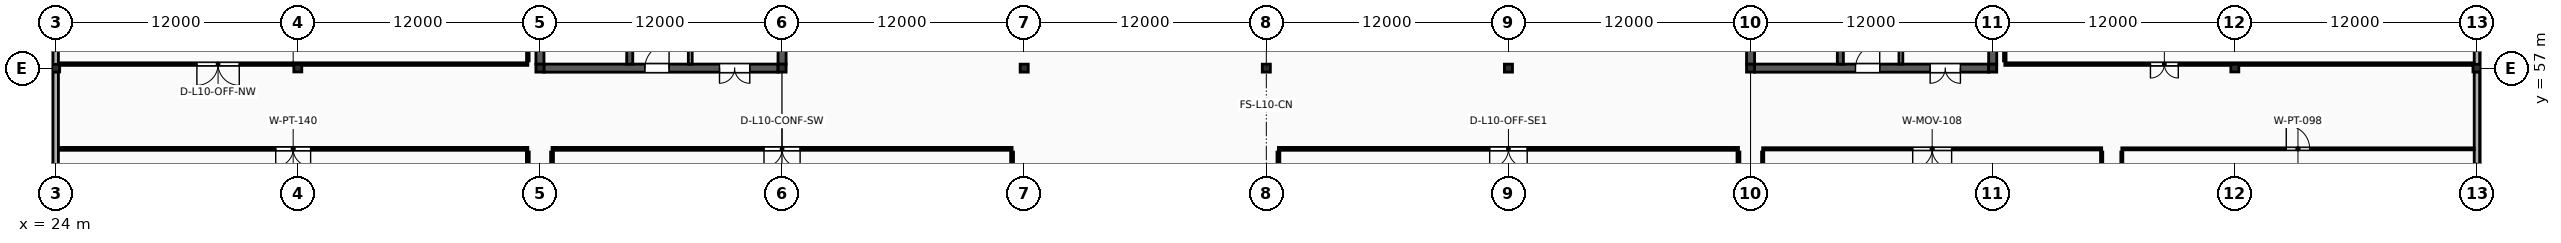
"""IFC4 building model, lengths in metres.
Left out: names, types, materials, properties, quantities, classifications, styles, units other than length and angle.
Written with IfcOpenShell. Run it as: python <this file> out.ifc"""

import sys

from ifc_helpers import new_model, si_unit, direction, frame, frame_2d, origin, origin_2d, place, context, subcontext, project, spatial, rectangle, i_section, extrude, element, fill, save


model = new_model("IFC4")
c1 = context("Model", 3, precision=1e-05, world=origin(), true_north=direction((0.0, 1.0)))
c2 = subcontext(c1, "Body", "Model", "MODEL_VIEW")
j1 = project(units=[si_unit("LENGTHUNIT", "METRE"), si_unit("PLANEANGLEUNIT", "RADIAN")], contexts=[c1])
p1 = place(None, origin())
s1 = spatial("IfcSite", under=j1, at=p1, CompositionType="ELEMENT")
p2 = place(p1, origin())
s2 = spatial("IfcBuilding", under=s1, at=p2, CompositionType="ELEMENT")
p3 = place(p2, frame((0.0, 0.0, 41.6)))
s3 = spatial("IfcBuildingStorey", under=s2, at=p3, CompositionType="ELEMENT", Elevation=41.6)
for number, where, z_axis, x_axis in (
    (1, (24.0, 57.0, 0.0), (0.0, 0.0, 1.0), (1.0, 0.0, 0.0)),
    (2, (36.0, 57.0, 0.0), (0.0, 0.0, 1.0), (1.0, 0.0, 0.0)),
):
    element("IfcColumn", number, at=place(p3, frame(where, z_axis=z_axis, x_axis=x_axis)), inside=s3, PredefinedType="COLUMN", context=c2, shape_type="SweptSolid", body=[
        extrude(i_section(OverallWidth=0.394, OverallDepth=0.375, WebThickness=0.017, FlangeThickness=0.028, FilletRadius=0.018, at=origin_2d()), origin(), (0.0, 0.0, 1.0), 4.0),
    ])
for number, where, z_axis, x_axis in (
    (3, (48.0, 57.0, 0.0), (0.0, 0.0, 1.0), (1.0, 0.0, 0.0)),
    (4, (60.0, 57.0, 0.0), (0.0, 0.0, 1.0), (1.0, 0.0, 0.0)),
    (5, (72.0, 57.0, 0.0), (0.0, 0.0, 1.0), (1.0, 0.0, 0.0)),
    (6, (84.0, 57.0, 0.0), (0.0, 0.0, 1.0), (1.0, 0.0, 0.0)),
    (7, (96.0, 57.0, 0.0), (0.0, 0.0, 1.0), (1.0, 0.0, 0.0)),
    (8, (108.0, 57.0, 0.0), (0.0, 0.0, 1.0), (1.0, 0.0, 0.0)),
    (9, (120.0, 57.0, 0.0), (0.0, 0.0, 1.0), (1.0, 0.0, 0.0)),
):
    element("IfcColumn", number, at=place(p3, frame(where, z_axis=z_axis, x_axis=x_axis)), inside=s3, PredefinedType="COLUMN", context=c2, shape_type="SweptSolid", body=[
        extrude(i_section(OverallWidth=0.399, OverallDepth=0.393, WebThickness=0.023, FlangeThickness=0.037, FilletRadius=0.018, at=origin_2d()), origin(), (0.0, 0.0, 1.0), 4.0),
    ])
for number, where, z_axis, x_axis in (
    (10, (132.0, 57.0, 0.0), (0.0, 0.0, 1.0), (1.0, 0.0, 0.0)),
    (11, (144.0, 57.0, 0.0), (0.0, 0.0, 1.0), (1.0, 0.0, 0.0)),
):
    element("IfcColumn", number, at=place(p3, frame(where, z_axis=z_axis, x_axis=x_axis)), inside=s3, PredefinedType="COLUMN", context=c2, shape_type="SweptSolid", body=[
        extrude(i_section(OverallWidth=0.394, OverallDepth=0.375, WebThickness=0.017, FlangeThickness=0.028, FilletRadius=0.018, at=origin_2d()), origin(), (0.0, 0.0, 1.0), 4.0),
    ])
p4 = place(p3, frame((48.197, 57.0, 0.0), z_axis=(0.0, 0.0, 1.0), x_axis=(1.0, 0.0, 0.0)))
e12 = element("IfcWall", 12, at=p4, inside=s3, PredefinedType="SHEAR", context=c2, shape_type="SweptSolid", body=[
    extrude(rectangle(XDim=11.607, YDim=0.4, at=frame_2d((5.803, 0.0))), origin(), (0.0, 0.0, 1.0), 3.828),
])
p5 = place(p4, frame((5.004, 0.0, 0.0)))
e13 = element("IfcOpeningElement", 13, at=p5, cuts=e12, PredefinedType="OPENING", context=c2, shape_type="SweptSolid", body=[
    extrude(rectangle(XDim=1.2, YDim=2.2, at=frame_2d((0.6, 1.1))), frame((0.0, 0.215, 0.0), z_axis=(0.0, -1.0, 0.0), x_axis=(1.0, 0.0, 0.0)), (0.0, 0.0, 1.0), 0.43),
])
p6 = place(p4, frame((8.703, 0.0, 0.0)))
e14 = element("IfcOpeningElement", 14, at=p6, cuts=e12, PredefinedType="OPENING", context=c2, shape_type="SweptSolid", body=[
    extrude(rectangle(XDim=1.5, YDim=2.25, at=frame_2d((0.75, 1.125))), frame((0.0, 0.215, 0.0), z_axis=(0.0, -1.0, 0.0), x_axis=(1.0, 0.0, 0.0)), (0.0, 0.0, 1.0), 0.43),
])
for number, where, z_axis, x_axis in (
    (15, (48.0, 57.194, 0.0), (0.0, 0.0, 1.0), (0.0, 1.0, 0.0)),
    (16, (60.0, 57.194, 0.0), (0.0, 0.0, 1.0), (0.0, 1.0, 0.0)),
):
    element("IfcWall", number, at=place(p3, frame(where, z_axis=z_axis, x_axis=x_axis)), inside=s3, PredefinedType="SHEAR", context=c2, shape_type="SweptSolid", body=[
        extrude(rectangle(XDim=11.613, YDim=0.4, at=frame_2d((5.806, 0.0))), origin(), (0.0, 0.0, 1.0), 3.828),
    ])
p7 = place(p3, frame((52.45, 57.197, 0.0), z_axis=(0.0, 0.0, 1.0), x_axis=(0.0, 1.0, 0.0)))
e17 = element("IfcWall", 17, at=p7, inside=s3, PredefinedType="SHEAR", context=c2, shape_type="SweptSolid", body=[
    extrude(rectangle(XDim=11.606, YDim=0.3, at=frame_2d((5.803, 0.0))), origin(), (0.0, 0.0, 1.0), 3.828),
])
p8 = place(p7, frame((0.9, 0.0, 0.0)))
e18 = element("IfcOpeningElement", 18, at=p8, cuts=e17, PredefinedType="OPENING", context=c2, shape_type="SweptSolid", body=[
    extrude(rectangle(XDim=1.1, YDim=2.2, at=frame_2d((0.55, 1.1))), frame((0.0, 0.165, 0.0), z_axis=(0.0, -1.0, 0.0), x_axis=(1.0, 0.0, 0.0)), (0.0, 0.0, 1.0), 0.33),
])
p9 = place(p3, frame((55.45, 57.2, 0.0), z_axis=(0.0, 0.0, 1.0), x_axis=(0.0, 1.0, 0.0)))
e19 = element("IfcWall", 19, at=p9, inside=s3, PredefinedType="SOLIDWALL", context=c2, shape_type="SweptSolid", body=[
    extrude(rectangle(XDim=8.48, YDim=0.19, at=frame_2d((4.24, 0.0))), origin(), (0.0, 0.0, 1.0), 3.818),
])
p10 = place(p9, frame((3.6, 0.0, 0.0)))
e20 = element("IfcOpeningElement", 20, at=p10, cuts=e19, PredefinedType="OPENING", context=c2, shape_type="SweptSolid", body=[
    extrude(rectangle(XDim=1.04, YDim=2.18, at=frame_2d((0.52, 1.09))), frame((0.0, 0.11, 0.0), z_axis=(0.0, -1.0, 0.0), x_axis=(1.0, 0.0, 0.0)), (0.0, 0.0, 1.0), 0.22),
])
p11 = place(p3, frame((108.197, 57.0, 0.0), z_axis=(0.0, 0.0, 1.0), x_axis=(1.0, 0.0, 0.0)))
e21 = element("IfcWall", 21, at=p11, inside=s3, PredefinedType="SHEAR", context=c2, shape_type="SweptSolid", body=[
    extrude(rectangle(XDim=11.607, YDim=0.4, at=frame_2d((5.803, 0.0))), origin(), (0.0, 0.0, 1.0), 3.828),
])
p12 = place(p11, frame((5.004, 0.0, 0.0)))
e22 = element("IfcOpeningElement", 22, at=p12, cuts=e21, PredefinedType="OPENING", context=c2, shape_type="SweptSolid", body=[
    extrude(rectangle(XDim=1.2, YDim=2.2, at=frame_2d((0.6, 1.1))), frame((0.0, 0.215, 0.0), z_axis=(0.0, -1.0, 0.0), x_axis=(1.0, 0.0, 0.0)), (0.0, 0.0, 1.0), 0.43),
])
p13 = place(p11, frame((8.704, 0.0, 0.0)))
e23 = element("IfcOpeningElement", 23, at=p13, cuts=e21, PredefinedType="OPENING", context=c2, shape_type="SweptSolid", body=[
    extrude(rectangle(XDim=1.5, YDim=2.25, at=frame_2d((0.75, 1.125))), frame((0.0, 0.215, 0.0), z_axis=(0.0, -1.0, 0.0), x_axis=(1.0, 0.0, 0.0)), (0.0, 0.0, 1.0), 0.43),
])
for number, where, z_axis, x_axis in (
    (24, (108.0, 57.194, 0.0), (0.0, 0.0, 1.0), (0.0, 1.0, 0.0)),
    (25, (120.0, 57.194, 0.0), (0.0, 0.0, 1.0), (0.0, 1.0, 0.0)),
):
    element("IfcWall", number, at=place(p3, frame(where, z_axis=z_axis, x_axis=x_axis)), inside=s3, PredefinedType="SHEAR", context=c2, shape_type="SweptSolid", body=[
        extrude(rectangle(XDim=11.613, YDim=0.4, at=frame_2d((5.806, 0.0))), origin(), (0.0, 0.0, 1.0), 3.828),
    ])
p14 = place(p3, frame((112.45, 57.197, 0.0), z_axis=(0.0, 0.0, 1.0), x_axis=(0.0, 1.0, 0.0)))
e26 = element("IfcWall", 26, at=p14, inside=s3, PredefinedType="SHEAR", context=c2, shape_type="SweptSolid", body=[
    extrude(rectangle(XDim=11.606, YDim=0.3, at=frame_2d((5.803, 0.0))), origin(), (0.0, 0.0, 1.0), 3.828),
])
p15 = place(p14, frame((0.9, 0.0, 0.0)))
e27 = element("IfcOpeningElement", 27, at=p15, cuts=e26, PredefinedType="OPENING", context=c2, shape_type="SweptSolid", body=[
    extrude(rectangle(XDim=1.1, YDim=2.2, at=frame_2d((0.55, 1.1))), frame((0.0, 0.165, 0.0), z_axis=(0.0, -1.0, 0.0), x_axis=(1.0, 0.0, 0.0)), (0.0, 0.0, 1.0), 0.33),
])
p16 = place(p3, frame((115.45, 57.2, 0.0), z_axis=(0.0, 0.0, 1.0), x_axis=(0.0, 1.0, 0.0)))
e28 = element("IfcWall", 28, at=p16, inside=s3, PredefinedType="SOLIDWALL", context=c2, shape_type="SweptSolid", body=[
    extrude(rectangle(XDim=8.48, YDim=0.19, at=frame_2d((4.24, 0.0))), origin(), (0.0, 0.0, 1.0), 3.818),
])
p17 = place(p16, frame((3.6, 0.0, 0.0)))
e29 = element("IfcOpeningElement", 29, at=p17, cuts=e28, PredefinedType="OPENING", context=c2, shape_type="SweptSolid", body=[
    extrude(rectangle(XDim=1.04, YDim=2.18, at=frame_2d((0.52, 1.09))), frame((0.0, 0.11, 0.0), z_axis=(0.0, -1.0, 0.0), x_axis=(1.0, 0.0, 0.0)), (0.0, 0.0, 1.0), 0.22),
])
p18 = place(p3, frame((24.0, 45.186, 0.0), z_axis=(0.0, 0.0, 1.0), x_axis=(0.0, 1.0, 0.0)))
e30 = element("IfcWall", 30, at=p18, inside=s3, PredefinedType="SOLIDWALL", context=c2, shape_type="SweptSolid", body=[
    extrude(rectangle(XDim=11.629, YDim=0.27, at=frame_2d((5.814, 0.0))), origin(), (0.0, 0.0, 1.0), 3.281),
])
p19 = place(p18, frame((4.564, 0.0, 0.78)))
e31 = element("IfcOpeningElement", 31, at=p19, cuts=e30, PredefinedType="OPENING", context=c2, shape_type="SweptSolid", body=[
    extrude(rectangle(XDim=2.5, YDim=1.9, at=frame_2d((1.25, 0.95))), frame((0.0, 0.15, 0.0), z_axis=(0.0, -1.0, 0.0), x_axis=(1.0, 0.0, 0.0)), (0.0, 0.0, 1.0), 0.3),
])
p20 = place(p3, frame((24.0, 57.186, 0.0), z_axis=(0.0, 0.0, 1.0), x_axis=(0.0, 1.0, 0.0)))
e32 = element("IfcWall", 32, at=p20, inside=s3, PredefinedType="SOLIDWALL", context=c2, shape_type="SweptSolid", body=[
    extrude(rectangle(XDim=11.629, YDim=0.27, at=frame_2d((5.814, 0.0))), origin(), (0.0, 0.0, 1.0), 3.281),
])
p21 = place(p20, frame((4.84, 0.0, 1.4)))
e33 = element("IfcOpeningElement", 33, at=p21, cuts=e32, PredefinedType="OPENING", context=c2, shape_type="SweptSolid", body=[
    extrude(rectangle(XDim=1.95, YDim=0.88, at=frame_2d((0.975, 0.44))), frame((0.0, 0.15, 0.0), z_axis=(0.0, -1.0, 0.0), x_axis=(1.0, 0.0, 0.0)), (0.0, 0.0, 1.0), 0.3),
])
p22 = place(p3, frame((144.0, 45.186, 0.0), z_axis=(0.0, 0.0, 1.0), x_axis=(0.0, 1.0, 0.0)))
e34 = element("IfcWall", 34, at=p22, inside=s3, PredefinedType="SOLIDWALL", context=c2, shape_type="SweptSolid", body=[
    extrude(rectangle(XDim=11.629, YDim=0.27, at=frame_2d((5.814, 0.0))), origin(), (0.0, 0.0, 1.0), 3.281),
])
p23 = place(p22, frame((4.54, 0.0, 1.4)))
e35 = element("IfcOpeningElement", 35, at=p23, cuts=e34, PredefinedType="OPENING", context=c2, shape_type="SweptSolid", body=[
    extrude(rectangle(XDim=2.55, YDim=0.88, at=frame_2d((1.275, 0.44))), frame((0.0, 0.15, 0.0), z_axis=(0.0, -1.0, 0.0), x_axis=(1.0, 0.0, 0.0)), (0.0, 0.0, 1.0), 0.3),
])
p24 = place(p3, frame((144.0, 57.186, 0.0), z_axis=(0.0, 0.0, 1.0), x_axis=(0.0, 1.0, 0.0)))
e36 = element("IfcWall", 36, at=p24, inside=s3, PredefinedType="SOLIDWALL", context=c2, shape_type="SweptSolid", body=[
    extrude(rectangle(XDim=11.629, YDim=0.27, at=frame_2d((5.814, 0.0))), origin(), (0.0, 0.0, 1.0), 3.281),
])
p25 = place(p24, frame((4.389, 0.0, 1.4)))
e37 = element("IfcOpeningElement", 37, at=p25, cuts=e36, PredefinedType="OPENING", context=c2, shape_type="SweptSolid", body=[
    extrude(rectangle(XDim=2.85, YDim=0.88, at=frame_2d((1.425, 0.44))), frame((0.0, 0.15, 0.0), z_axis=(0.0, -1.0, 0.0), x_axis=(1.0, 0.0, 0.0)), (0.0, 0.0, 1.0), 0.3),
])
p26 = place(p3, frame((24.14, 53.0, 0.0), z_axis=(0.0, 0.0, 1.0), x_axis=(1.0, 0.0, 0.0)))
e38 = element("IfcWall", 38, at=p26, inside=s3, PredefinedType="PARTITIONING", context=c2, shape_type="SweptSolid", body=[
    extrude(rectangle(XDim=23.26, YDim=0.14, at=frame_2d((11.63, 0.0))), origin(), (0.0, 0.0, 1.0), 2.88),
])
p27 = place(p26, frame((10.765, 0.0, 0.0)))
e39 = element("IfcOpeningElement", 39, at=p27, cuts=e38, PredefinedType="OPENING", context=c2, shape_type="SweptSolid", body=[
    extrude(rectangle(XDim=1.73, YDim=2.37, at=frame_2d((0.865, 1.185))), frame((0.0, 0.085, 0.0), z_axis=(0.0, -1.0, 0.0), x_axis=(1.0, 0.0, 0.0)), (0.0, 0.0, 1.0), 0.17),
])
p28 = place(p3, frame((47.4, 27.14, 0.0), z_axis=(0.0, 0.0, 1.0), x_axis=(0.0, 1.0, 0.0)))
e40 = element("IfcWall", 40, at=p28, inside=s3, PredefinedType="PARTITIONING", context=c2, shape_type="SweptSolid", body=[
    extrude(rectangle(XDim=25.7, YDim=0.14, at=frame_2d((12.85, 0.0))), origin(), (0.0, 0.0, 1.0), 2.88),
])
p29 = place(p3, frame((48.6, 53.0, 0.0), z_axis=(0.0, 0.0, 1.0), x_axis=(1.0, 0.0, 0.0)))
e41 = element("IfcWall", 41, at=p29, inside=s3, PredefinedType="PARTITIONING", context=c2, shape_type="SweptSolid", body=[
    extrude(rectangle(XDim=22.8, YDim=0.14, at=frame_2d((11.4, 0.0))), origin(), (0.0, 0.0, 1.0), 2.88),
])
p30 = place(p29, frame((10.505, 0.0, 0.0)))
e42 = element("IfcOpeningElement", 42, at=p30, cuts=e41, PredefinedType="OPENING", context=c2, shape_type="SweptSolid", body=[
    extrude(rectangle(XDim=1.79, YDim=2.39, at=frame_2d((0.895, 1.195))), frame((0.0, 0.085, 0.0), z_axis=(0.0, -1.0, 0.0), x_axis=(1.0, 0.0, 0.0)), (0.0, 0.0, 1.0), 0.17),
])
for number, where, z_axis, x_axis in (
    (43, (48.6, 27.14, 0.0), (0.0, 0.0, 1.0), (0.0, 1.0, 0.0)),
    (44, (71.4, 27.14, 0.0), (0.0, 0.0, 1.0), (0.0, 1.0, 0.0)),
):
    element("IfcWall", number, at=place(p3, frame(where, z_axis=z_axis, x_axis=x_axis)), inside=s3, PredefinedType="PARTITIONING", context=c2, shape_type="SweptSolid", body=[
        extrude(rectangle(XDim=25.7, YDim=0.14, at=frame_2d((12.85, 0.0))), origin(), (0.0, 0.0, 1.0), 2.88),
    ])
p31 = place(p3, frame((84.6, 53.0, 0.0), z_axis=(0.0, 0.0, 1.0), x_axis=(1.0, 0.0, 0.0)))
e45 = element("IfcWall", 45, at=p31, inside=s3, PredefinedType="PARTITIONING", context=c2, shape_type="SweptSolid", body=[
    extrude(rectangle(XDim=22.8, YDim=0.14, at=frame_2d((11.4, 0.0))), origin(), (0.0, 0.0, 1.0), 2.88),
])
p32 = place(p31, frame((10.47, 0.0, 0.0)))
e46 = element("IfcOpeningElement", 46, at=p32, cuts=e45, PredefinedType="OPENING", context=c2, shape_type="SweptSolid", body=[
    extrude(rectangle(XDim=1.86, YDim=2.41, at=frame_2d((0.93, 1.205))), frame((0.0, 0.085, 0.0), z_axis=(0.0, -1.0, 0.0), x_axis=(1.0, 0.0, 0.0)), (0.0, 0.0, 1.0), 0.17),
])
for number, where, z_axis, x_axis in (
    (47, (84.6, 27.14, 0.0), (0.0, 0.0, 1.0), (0.0, 1.0, 0.0)),
    (48, (107.4, 27.14, 0.0), (0.0, 0.0, 1.0), (0.0, 1.0, 0.0)),
):
    element("IfcWall", number, at=place(p3, frame(where, z_axis=z_axis, x_axis=x_axis)), inside=s3, PredefinedType="PARTITIONING", context=c2, shape_type="SweptSolid", body=[
        extrude(rectangle(XDim=25.7, YDim=0.14, at=frame_2d((12.85, 0.0))), origin(), (0.0, 0.0, 1.0), 2.88),
    ])
p33 = place(p3, frame((108.6, 53.0, 0.0), z_axis=(0.0, 0.0, 1.0), x_axis=(1.0, 0.0, 0.0)))
e49 = element("IfcWall", 49, at=p33, inside=s3, PredefinedType="MOVABLE", context=c2, shape_type="SweptSolid", body=[
    extrude(rectangle(XDim=16.8, YDim=0.108, at=frame_2d((8.4, 0.0))), origin(), (0.0, 0.0, 1.0), 2.88),
])
p34 = place(p33, frame((7.435, 0.0, 0.0)))
e50 = element("IfcOpeningElement", 50, at=p34, cuts=e49, PredefinedType="OPENING", context=c2, shape_type="SweptSolid", body=[
    extrude(rectangle(XDim=1.93, YDim=2.43, at=frame_2d((0.965, 1.215))), frame((0.0, 0.069, 0.0), z_axis=(0.0, -1.0, 0.0), x_axis=(1.0, 0.0, 0.0)), (0.0, 0.0, 1.0), 0.138),
])
for number, where, z_axis, x_axis in (
    (51, (108.6, 27.14, 0.0), (0.0, 0.0, 1.0), (0.0, 1.0, 0.0)),
    (52, (125.4, 27.14, 0.0), (0.0, 0.0, 1.0), (0.0, 1.0, 0.0)),
):
    element("IfcWall", number, at=place(p3, frame(where, z_axis=z_axis, x_axis=x_axis)), inside=s3, PredefinedType="MOVABLE", context=c2, shape_type="SweptSolid", body=[
        extrude(rectangle(XDim=25.7, YDim=0.108, at=frame_2d((12.85, 0.0))), origin(), (0.0, 0.0, 1.0), 2.88),
    ])
p35 = place(p3, frame((126.4, 53.0, 0.0), z_axis=(0.0, 0.0, 1.0), x_axis=(1.0, 0.0, 0.0)))
e53 = element("IfcWall", 53, at=p35, inside=s3, PredefinedType="PARTITIONING", context=c2, shape_type="SweptSolid", body=[
    extrude(rectangle(XDim=17.46, YDim=0.098, at=frame_2d((8.73, 0.0))), origin(), (0.0, 0.0, 1.0), 2.88),
])
p36 = place(p35, frame((8.15, 0.0, 0.0)))
e54 = element("IfcOpeningElement", 54, at=p36, cuts=e53, PredefinedType="OPENING", context=c2, shape_type="SweptSolid", body=[
    extrude(rectangle(XDim=1.16, YDim=2.23, at=frame_2d((0.58, 1.115))), frame((0.0, 0.064, 0.0), z_axis=(0.0, -1.0, 0.0), x_axis=(1.0, 0.0, 0.0)), (0.0, 0.0, 1.0), 0.128),
])
p37 = place(p3, frame((126.4, 27.14, 0.0), z_axis=(0.0, 0.0, 1.0), x_axis=(0.0, 1.0, 0.0)))
e55 = element("IfcWall", 55, at=p37, inside=s3, PredefinedType="PARTITIONING", context=c2, shape_type="SweptSolid", body=[
    extrude(rectangle(XDim=25.7, YDim=0.098, at=frame_2d((12.85, 0.0))), origin(), (0.0, 0.0, 1.0), 2.88),
])
p38 = place(p3, frame((24.14, 57.2, 0.0), z_axis=(0.0, 0.0, 1.0), x_axis=(1.0, 0.0, 0.0)))
e56 = element("IfcWall", 56, at=p38, inside=s3, PredefinedType="PARTITIONING", context=c2, shape_type="SweptSolid", body=[
    extrude(rectangle(XDim=23.26, YDim=0.125, at=frame_2d((11.63, 0.0))), origin(), (0.0, 0.0, 1.0), 2.88),
])
p39 = place(p38, frame((6.858, 0.0, 0.0)))
e57 = element("IfcOpeningElement", 57, at=p39, cuts=e56, PredefinedType="OPENING", context=c2, shape_type="SweptSolid", body=[
    extrude(rectangle(XDim=2.1, YDim=2.47, at=frame_2d((1.05, 1.235))), frame((0.0, 0.077, 0.0), z_axis=(0.0, -1.0, 0.0), x_axis=(1.0, 0.0, 0.0)), (0.0, 0.0, 1.0), 0.155),
])
p40 = place(p3, frame((47.4, 57.36, 0.0), z_axis=(0.0, 0.0, 1.0), x_axis=(0.0, 1.0, 0.0)))
e58 = element("IfcWall", 58, at=p40, inside=s3, PredefinedType="PARTITIONING", context=c2, shape_type="SweptSolid", body=[
    extrude(rectangle(XDim=11.5, YDim=0.125, at=frame_2d((5.75, 0.0))), origin(), (0.0, 0.0, 1.0), 2.88),
])
p41 = place(p3, frame((120.6, 57.2, 0.0), z_axis=(0.0, 0.0, 1.0), x_axis=(1.0, 0.0, 0.0)))
e59 = element("IfcWall", 59, at=p41, inside=s3, PredefinedType="PARTITIONING", context=c2, shape_type="SweptSolid", body=[
    extrude(rectangle(XDim=23.26, YDim=0.125, at=frame_2d((11.63, 0.0))), origin(), (0.0, 0.0, 1.0), 2.88),
])
p42 = place(p41, frame((7.218, 0.0, 0.0)))
e60 = element("IfcOpeningElement", 60, at=p42, cuts=e59, PredefinedType="OPENING", context=c2, shape_type="SweptSolid", body=[
    extrude(rectangle(XDim=1.38, YDim=2.23, at=frame_2d((0.69, 1.115))), frame((0.0, 0.077, 0.0), z_axis=(0.0, -1.0, 0.0), x_axis=(1.0, 0.0, 0.0)), (0.0, 0.0, 1.0), 0.155),
])
p43 = place(p3, frame((120.6, 57.36, 0.0), z_axis=(0.0, 0.0, 1.0), x_axis=(0.0, 1.0, 0.0)))
e61 = element("IfcWall", 61, at=p43, inside=s3, PredefinedType="PARTITIONING", context=c2, shape_type="SweptSolid", body=[
    extrude(rectangle(XDim=11.5, YDim=0.125, at=frame_2d((5.75, 0.0))), origin(), (0.0, 0.0, 1.0), 2.88),
])
p44 = place(p5, origin())
e62 = element("IfcDoor", 62, at=p44, inside=s3, OperationType="SINGLE_SWING_RIGHT", PredefinedType="DOOR", context=c2, shape_type="SweptSolid", body=[
    extrude(rectangle(XDim=1.2, YDim=2.2, at=frame_2d((0.6, 1.1))), frame((0.0, 0.025, 0.0), z_axis=(0.0, -1.0, 0.0), x_axis=(1.0, 0.0, 0.0)), (0.0, 0.0, 1.0), 0.05),
])
fill(e13, e62)
p45 = place(p6, origin())
e63 = element("IfcDoor", 63, at=p45, inside=s3, OperationType="DOUBLE_DOOR_SINGLE_SWING", PredefinedType="DOOR", context=c2, shape_type="SweptSolid", body=[
    extrude(rectangle(XDim=1.5, YDim=2.25, at=frame_2d((0.75, 1.125))), frame((0.0, 0.025, 0.0), z_axis=(0.0, -1.0, 0.0), x_axis=(1.0, 0.0, 0.0)), (0.0, 0.0, 1.0), 0.05),
])
fill(e14, e63)
p46 = place(p12, origin())
e64 = element("IfcDoor", 64, at=p46, inside=s3, OperationType="SINGLE_SWING_RIGHT", PredefinedType="DOOR", context=c2, shape_type="SweptSolid", body=[
    extrude(rectangle(XDim=1.2, YDim=2.2, at=frame_2d((0.6, 1.1))), frame((0.0, 0.025, 0.0), z_axis=(0.0, -1.0, 0.0), x_axis=(1.0, 0.0, 0.0)), (0.0, 0.0, 1.0), 0.05),
])
fill(e22, e64)
p47 = place(p13, origin())
e65 = element("IfcDoor", 65, at=p47, inside=s3, OperationType="DOUBLE_DOOR_SINGLE_SWING", PredefinedType="DOOR", context=c2, shape_type="SweptSolid", body=[
    extrude(rectangle(XDim=1.5, YDim=2.25, at=frame_2d((0.75, 1.125))), frame((0.0, 0.025, 0.0), z_axis=(0.0, -1.0, 0.0), x_axis=(1.0, 0.0, 0.0)), (0.0, 0.0, 1.0), 0.05),
])
fill(e23, e65)
p48 = place(p27, origin())
e66 = element("IfcDoor", 66, at=p48, inside=s3, OperationType="DOUBLE_DOOR_SINGLE_SWING", PredefinedType="DOOR", context=c2, shape_type="SweptSolid", body=[
    extrude(rectangle(XDim=1.73, YDim=2.37, at=frame_2d((0.865, 1.185))), frame((0.0, 0.025, 0.0), z_axis=(0.0, -1.0, 0.0), x_axis=(1.0, 0.0, 0.0)), (0.0, 0.0, 1.0), 0.05),
])
fill(e39, e66)
p49 = place(p30, origin())
e67 = element("IfcDoor", 67, at=p49, inside=s3, OperationType="DOUBLE_DOOR_SINGLE_SWING", PredefinedType="DOOR", context=c2, shape_type="SweptSolid", body=[
    extrude(rectangle(XDim=1.79, YDim=2.39, at=frame_2d((0.895, 1.195))), frame((0.0, 0.025, 0.0), z_axis=(0.0, -1.0, 0.0), x_axis=(1.0, 0.0, 0.0)), (0.0, 0.0, 1.0), 0.05),
])
fill(e42, e67)
p50 = place(p32, origin())
e68 = element("IfcDoor", 68, at=p50, inside=s3, OperationType="DOUBLE_DOOR_SINGLE_SWING", PredefinedType="DOOR", context=c2, shape_type="SweptSolid", body=[
    extrude(rectangle(XDim=1.86, YDim=2.41, at=frame_2d((0.93, 1.205))), frame((0.0, 0.025, 0.0), z_axis=(0.0, -1.0, 0.0), x_axis=(1.0, 0.0, 0.0)), (0.0, 0.0, 1.0), 0.05),
])
fill(e46, e68)
p51 = place(p34, origin())
e69 = element("IfcDoor", 69, at=p51, inside=s3, OperationType="DOUBLE_DOOR_SINGLE_SWING", PredefinedType="DOOR", context=c2, shape_type="SweptSolid", body=[
    extrude(rectangle(XDim=1.93, YDim=2.43, at=frame_2d((0.965, 1.215))), frame((0.0, 0.025, 0.0), z_axis=(0.0, -1.0, 0.0), x_axis=(1.0, 0.0, 0.0)), (0.0, 0.0, 1.0), 0.05),
])
fill(e50, e69)
p52 = place(p36, origin())
e70 = element("IfcDoor", 70, at=p52, inside=s3, OperationType="SINGLE_SWING_LEFT", PredefinedType="DOOR", context=c2, shape_type="SweptSolid", body=[
    extrude(rectangle(XDim=1.16, YDim=2.23, at=frame_2d((0.58, 1.115))), frame((0.0, 0.025, 0.0), z_axis=(0.0, -1.0, 0.0), x_axis=(1.0, 0.0, 0.0)), (0.0, 0.0, 1.0), 0.05),
])
fill(e54, e70)
p53 = place(p39, origin())
e71 = element("IfcDoor", 71, at=p53, inside=s3, OperationType="DOUBLE_DOOR_SINGLE_SWING", PredefinedType="DOOR", context=c2, shape_type="SweptSolid", body=[
    extrude(rectangle(XDim=2.1, YDim=2.47, at=frame_2d((1.05, 1.235))), frame((0.0, 0.025, 0.0), z_axis=(0.0, -1.0, 0.0), x_axis=(1.0, 0.0, 0.0)), (0.0, 0.0, 1.0), 0.05),
])
fill(e57, e71)
p54 = place(p42, origin())
e72 = element("IfcDoor", 72, at=p54, inside=s3, OperationType="DOUBLE_DOOR_SINGLE_SWING", PredefinedType="DOOR", context=c2, shape_type="SweptSolid", body=[
    extrude(rectangle(XDim=1.38, YDim=2.23, at=frame_2d((0.69, 1.115))), frame((0.0, 0.025, 0.0), z_axis=(0.0, -1.0, 0.0), x_axis=(1.0, 0.0, 0.0)), (0.0, 0.0, 1.0), 0.05),
])
fill(e60, e72)
save(model, sys.argv[1])
